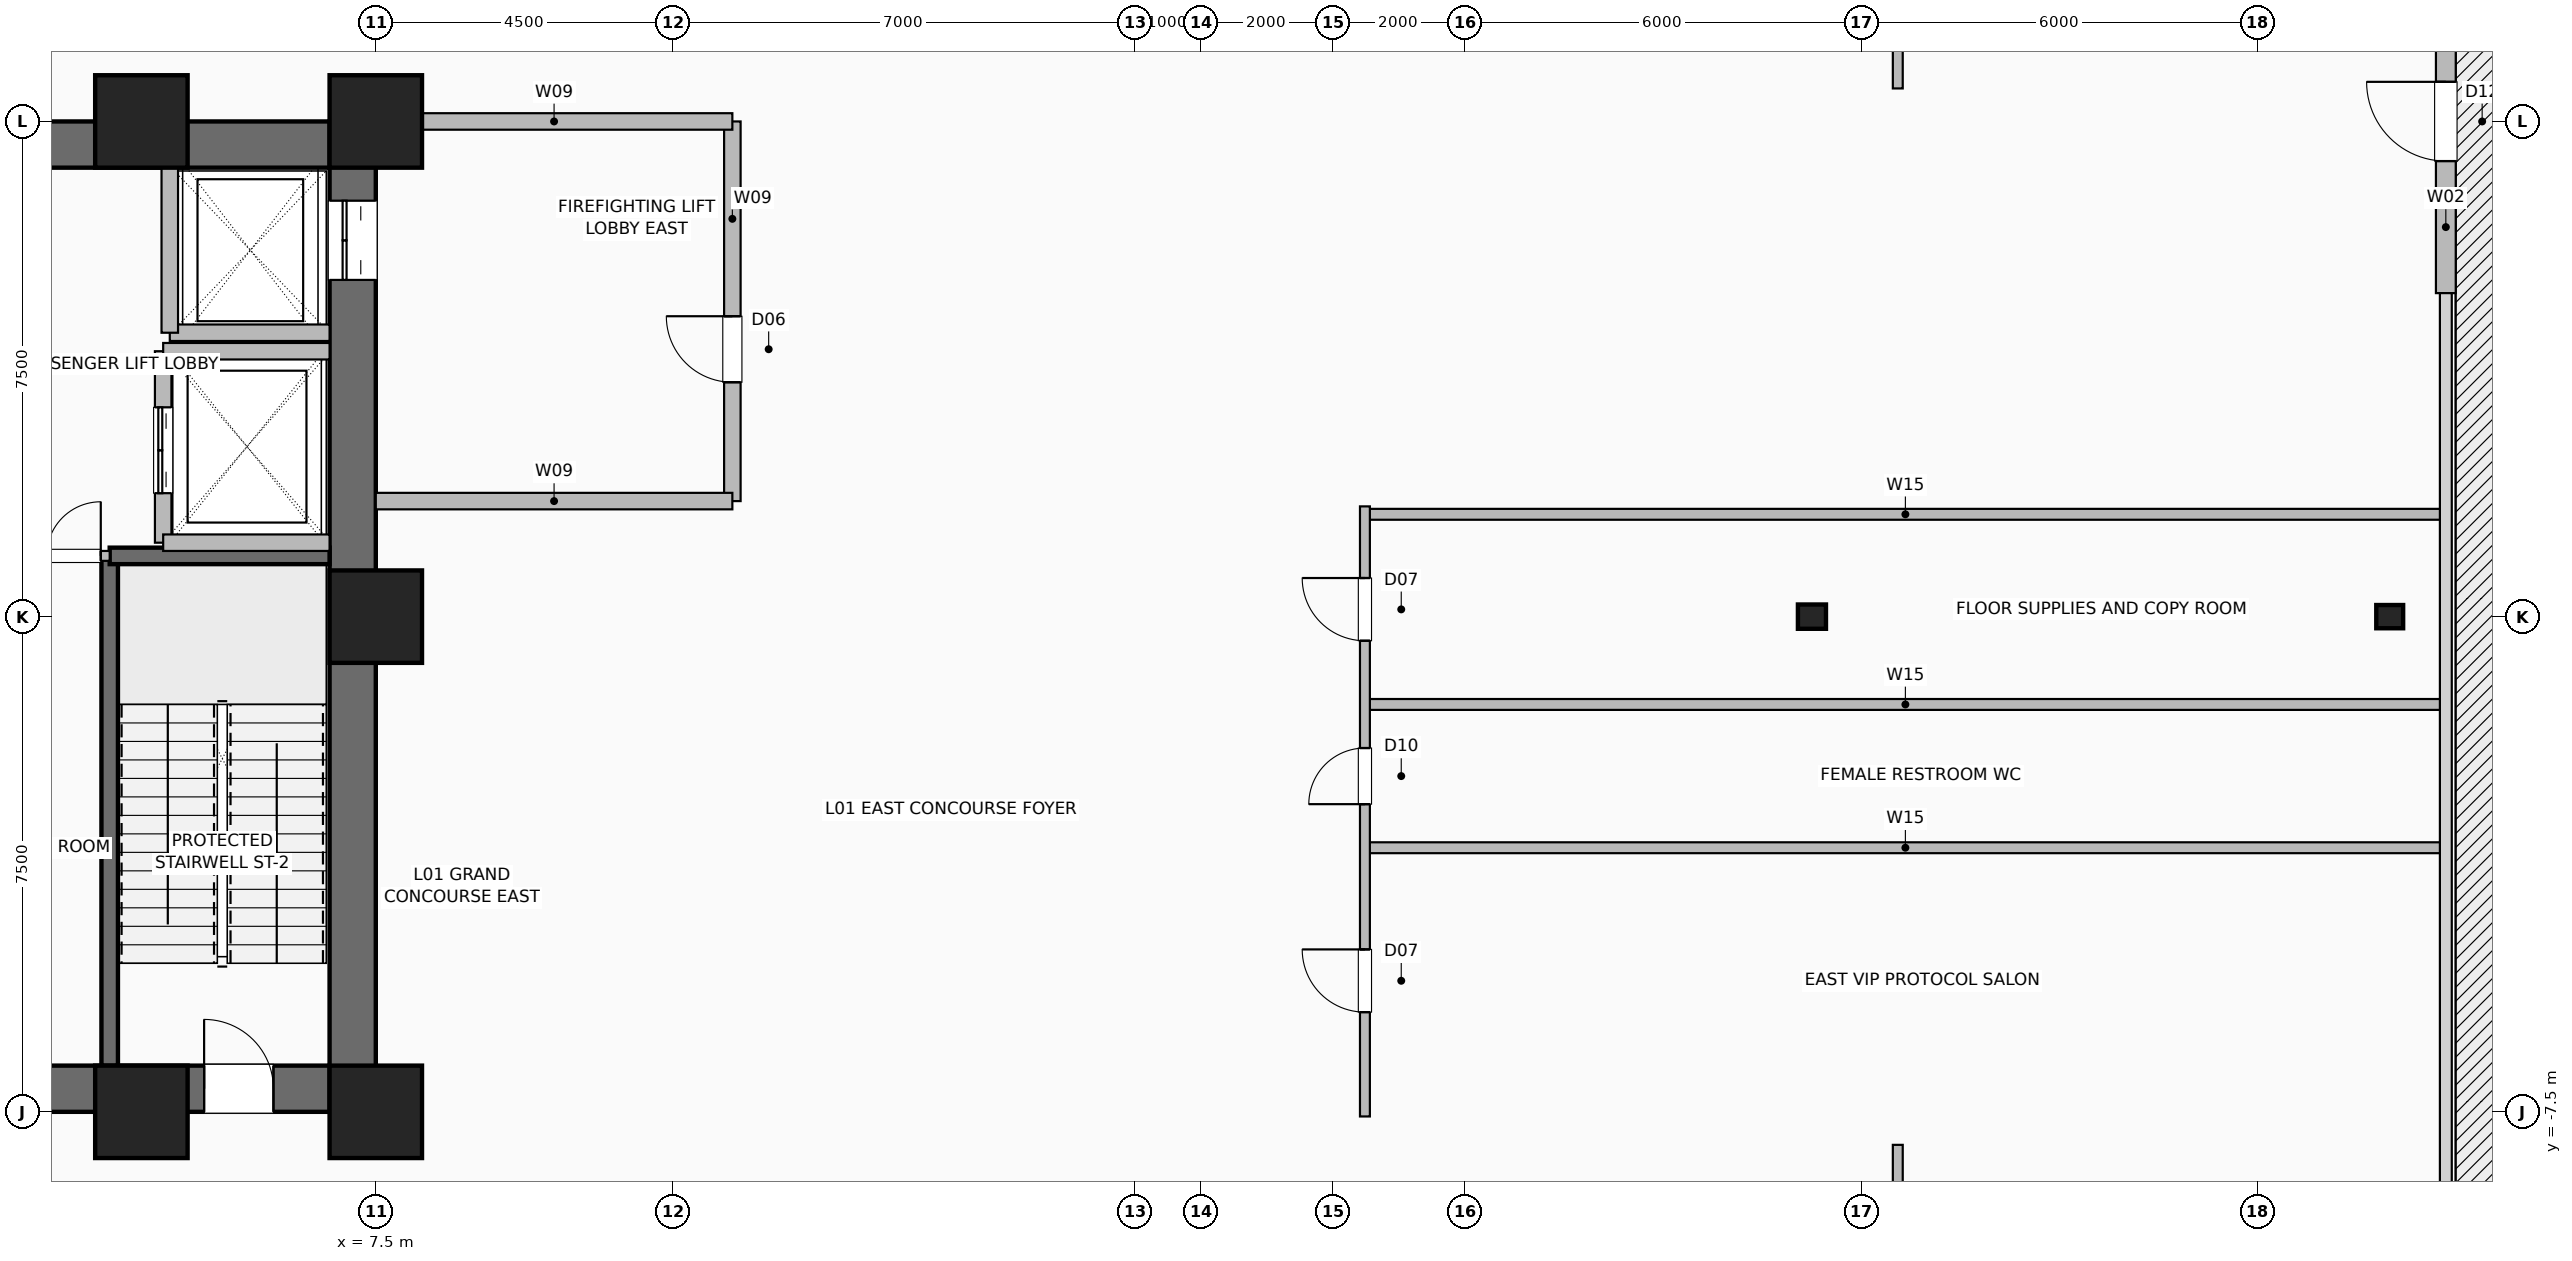
"""IFC4 building model, lengths in metres.
Left out: names, types, materials, properties, quantities, classifications, styles, units other than length and angle.
Written with IfcOpenShell. Run it as: python <this file> out.ifc"""

import sys

from ifc_helpers import new_model, si_unit, direction, frame, frame_2d, origin, origin_2d, place, context, subcontext, project, spatial, rectangle, hollow_rectangle, i_section, extrude, element, fill, save


model = new_model("IFC4")
c1 = context("Model", 3, precision=1e-05, world=origin(), true_north=direction((0.0, 1.0)))
c2 = subcontext(c1, "Body", "Model", "MODEL_VIEW")
j1 = project(units=[si_unit("LENGTHUNIT", "METRE"), si_unit("PLANEANGLEUNIT", "RADIAN")], contexts=[c1])
p1 = place(None, origin())
s1 = spatial("IfcSite", under=j1, at=p1, CompositionType="ELEMENT")
p2 = place(p1, origin())
s2 = spatial("IfcBuilding", under=s1, at=p2, CompositionType="ELEMENT")
p3 = place(p2, frame((0.0, 0.0, 5.4)))
s3 = spatial("IfcBuildingStorey", under=s2, at=p3, CompositionType="ELEMENT", Elevation=5.4)
for number, where, z_axis, x_axis in (
    (1, (3.95, -7.5, 0.0), (0.0, 0.0, 1.0), (1.0, 0.0, 0.0)),
    (2, (7.5, -7.5, 0.0), (0.0, 0.0, 1.0), (1.0, 0.0, 0.0)),
    (3, (7.5, 0.0, 0.0), (0.0, 0.0, 1.0), (1.0, 0.0, 0.0)),
    (4, (7.5, 7.5, 0.0), (0.0, 0.0, 1.0), (1.0, 0.0, 0.0)),
    (5, (3.95, 7.5, 0.0), (0.0, 0.0, 1.0), (1.0, 0.0, 0.0)),
):
    element("IfcColumn", number, at=place(p3, frame(where, z_axis=z_axis, x_axis=x_axis)), inside=s3, PredefinedType="COLUMN", context=c2, shape_type="SweptSolid", body=[
        extrude(hollow_rectangle(XDim=1.4, YDim=1.4, WallThickness=0.06, at=origin_2d()), origin(), (0.0, 0.0, 1.0), 5.4),
    ])
p4 = place(p3, frame((29.25, 0.0, 0.0), z_axis=(0.0, 0.0, 1.0), x_axis=(1.0, 0.0, 0.0)))
e6 = element("IfcColumn", 6, at=p4, inside=s3, PredefinedType="COLUMN", context=c2, shape_type="SweptSolid", body=[
    extrude(i_section(OverallWidth=0.368, OverallDepth=0.425, WebThickness=0.03, FlangeThickness=0.048, FilletRadius=0.02, at=origin_2d()), origin(), (0.0, 0.0, 1.0), 5.4),
])
p5 = place(p3, frame((38.0, 0.0, -0.4), z_axis=(0.0, 0.0, 1.0), x_axis=(1.0, 0.0, 0.0)))
e7 = element("IfcColumn", 7, at=p5, inside=s3, PredefinedType="COLUMN", context=c2, shape_type="SweptSolid", body=[
    extrude(i_section(OverallWidth=0.352, OverallDepth=0.407, WebThickness=0.025, FlangeThickness=0.04, FilletRadius=0.02, at=origin_2d()), origin(), (0.0, 0.0, 1.0), 5.4),
])
p6 = place(p3, frame((38.85, 4.9, 0.0), z_axis=(0.0, 0.0, 1.0), x_axis=(0.0, 1.0, 0.0)))
e8 = element("IfcWall", 8, at=p6, inside=s3, PredefinedType="SOLIDWALL", context=c2, shape_type="SweptSolid", body=[
    extrude(rectangle(XDim=5.2, YDim=0.3, at=frame_2d((2.6, 0.0))), origin(), (0.0, 0.0, 1.0), 5.0),
])
p7 = place(p6, frame((2.0, 0.0, 0.0)))
e9 = element("IfcOpeningElement", 9, at=p7, cuts=e8, PredefinedType="OPENING", context=c2, shape_type="SweptSolid", body=[
    extrude(rectangle(XDim=1.2, YDim=2.25, at=frame_2d((0.6, 1.125))), frame((0.0, 0.16, 0.0), z_axis=(0.0, -1.0, 0.0), x_axis=(1.0, 0.0, 0.0)), (0.0, 0.0, 1.0), 0.32),
])
p8 = place(p3, frame((-7.5, -7.15, 0.0), z_axis=(0.0, 0.0, 1.0), x_axis=(1.0, 0.0, 0.0)))
e10 = element("IfcWall", 10, at=p8, inside=s3, PredefinedType="SHEAR", context=c2, shape_type="SweptSolid", body=[
    extrude(rectangle(XDim=15.0, YDim=0.7, at=frame_2d((7.5, 0.0))), origin(), (0.0, 0.0, 1.0), 5.0),
])
p9 = place(p8, frame((1.55, 0.0, 0.0)))
e11 = element("IfcOpeningElement", 11, at=p9, cuts=e10, PredefinedType="OPENING", context=c2, shape_type="SweptSolid", body=[
    extrude(rectangle(XDim=1.05, YDim=2.08, at=frame_2d((0.525, 1.04))), frame((0.0, 0.36, 0.0), z_axis=(0.0, -1.0, 0.0), x_axis=(1.0, 0.0, 0.0)), (0.0, 0.0, 1.0), 0.72),
])
p10 = place(p8, frame((12.4, 0.0, 0.0)))
e12 = element("IfcOpeningElement", 12, at=p10, cuts=e10, PredefinedType="OPENING", context=c2, shape_type="SweptSolid", body=[
    extrude(rectangle(XDim=1.05, YDim=2.08, at=frame_2d((0.525, 1.04))), frame((0.0, 0.36, 0.0), z_axis=(0.0, -1.0, 0.0), x_axis=(1.0, 0.0, 0.0)), (0.0, 0.0, 1.0), 0.72),
])
p11 = place(p8, frame((4.64, 0.0, 0.0)))
e13 = element("IfcOpeningElement", 13, at=p11, cuts=e10, PredefinedType="OPENING", context=c2, shape_type="SweptSolid", body=[
    extrude(rectangle(XDim=1.1, YDim=2.2, at=frame_2d((0.55, 1.1))), frame((0.0, 0.36, 0.0), z_axis=(0.0, -1.0, 0.0), x_axis=(1.0, 0.0, 0.0)), (0.0, 0.0, 1.0), 0.72),
])
p12 = place(p8, frame((6.52, 0.0, 0.0)))
e14 = element("IfcOpeningElement", 14, at=p12, cuts=e10, PredefinedType="OPENING", context=c2, shape_type="SweptSolid", body=[
    extrude(rectangle(XDim=1.1, YDim=2.2, at=frame_2d((0.55, 1.1))), frame((0.0, 0.36, 0.0), z_axis=(0.0, -1.0, 0.0), x_axis=(1.0, 0.0, 0.0)), (0.0, 0.0, 1.0), 0.72),
])
p13 = place(p8, frame((8.4, 0.0, 0.0)))
e15 = element("IfcOpeningElement", 15, at=p13, cuts=e10, PredefinedType="OPENING", context=c2, shape_type="SweptSolid", body=[
    extrude(rectangle(XDim=1.1, YDim=2.2, at=frame_2d((0.55, 1.1))), frame((0.0, 0.36, 0.0), z_axis=(0.0, -1.0, 0.0), x_axis=(1.0, 0.0, 0.0)), (0.0, 0.0, 1.0), 0.72),
])
p14 = place(p3, frame((-7.5, 7.15, 0.0), z_axis=(0.0, 0.0, 1.0), x_axis=(1.0, 0.0, 0.0)))
e16 = element("IfcWall", 16, at=p14, inside=s3, PredefinedType="SHEAR", context=c2, shape_type="SweptSolid", body=[
    extrude(rectangle(XDim=15.0, YDim=0.7, at=frame_2d((7.5, 0.0))), origin(), (0.0, 0.0, 1.0), 5.0),
])
p15 = place(p3, frame((7.15, -7.5, 0.0), z_axis=(0.0, 0.0, 1.0), x_axis=(0.0, 1.0, 0.0)))
e17 = element("IfcWall", 17, at=p15, inside=s3, PredefinedType="SHEAR", context=c2, shape_type="SweptSolid", body=[
    extrude(rectangle(XDim=15.0, YDim=0.7, at=frame_2d((7.5, 0.0))), origin(), (0.0, 0.0, 1.0), 5.0),
])
p16 = place(p15, frame((12.6, 0.0, 0.0)))
e18 = element("IfcOpeningElement", 18, at=p16, cuts=e17, PredefinedType="OPENING", context=c2, shape_type="SweptSolid", body=[
    extrude(rectangle(XDim=1.2, YDim=2.2, at=frame_2d((0.6, 1.1))), frame((0.0, 0.36, 0.0), z_axis=(0.0, -1.0, 0.0), x_axis=(1.0, 0.0, 0.0)), (0.0, 0.0, 1.0), 0.72),
])
p17 = place(p3, frame((3.47, -6.8, 0.0), z_axis=(0.0, 0.0, 1.0), x_axis=(0.0, 1.0, 0.0)))
e19 = element("IfcWall", 19, at=p17, inside=s3, PredefinedType="SHEAR", context=c2, shape_type="SweptSolid", body=[
    extrude(rectangle(XDim=7.72, YDim=0.25, at=frame_2d((3.86, 0.0))), origin(), (0.0, 0.0, 1.0), 5.0),
])
p18 = place(p3, frame((3.47, 0.92, 0.0), z_axis=(0.0, 0.0, 1.0), x_axis=(1.0, 0.0, 0.0)))
e20 = element("IfcWall", 20, at=p18, inside=s3, PredefinedType="SHEAR", context=c2, shape_type="SweptSolid", body=[
    extrude(rectangle(XDim=3.33, YDim=0.25, at=frame_2d((1.665, 0.0))), origin(), (0.0, 0.0, 1.0), 5.0),
])
p19 = place(p3, frame((4.38, 4.3, 0.0), z_axis=(0.0, 0.0, 1.0), x_axis=(1.0, 0.0, 0.0)))
e21 = element("IfcWall", 21, at=p19, inside=s3, PredefinedType="SHEAR", context=c2, shape_type="SweptSolid", body=[
    extrude(rectangle(XDim=2.42, YDim=0.25, at=frame_2d((1.21, 0.0))), origin(), (0.0, 0.0, 1.0), 5.0),
])
p20 = place(p3, frame((4.38, 4.3, 0.0), z_axis=(0.0, 0.0, 1.0), x_axis=(0.0, 1.0, 0.0)))
e22 = element("IfcWall", 22, at=p20, inside=s3, PredefinedType="SHEAR", context=c2, shape_type="SweptSolid", body=[
    extrude(rectangle(XDim=2.5, YDim=0.25, at=frame_2d((1.25, 0.0))), origin(), (0.0, 0.0, 1.0), 5.0),
])
p21 = place(p3, frame((4.28, 1.12, 0.0), z_axis=(0.0, 0.0, 1.0), x_axis=(0.0, 1.0, 0.0)))
e23 = element("IfcWall", 23, at=p21, inside=s3, PredefinedType="SHEAR", context=c2, shape_type="SweptSolid", body=[
    extrude(rectangle(XDim=2.9, YDim=0.25, at=frame_2d((1.45, 0.0))), origin(), (0.0, 0.0, 1.0), 5.0),
])
p22 = place(p21, frame((0.75, 0.0, 0.0)))
e24 = element("IfcOpeningElement", 24, at=p22, cuts=e23, PredefinedType="OPENING", context=c2, shape_type="SweptSolid", body=[
    extrude(rectangle(XDim=1.3, YDim=2.3, at=frame_2d((0.65, 1.15))), frame((0.0, 0.135, 0.0), z_axis=(0.0, -1.0, 0.0), x_axis=(1.0, 0.0, 0.0)), (0.0, 0.0, 1.0), 0.27),
])
for number, where, z_axis, x_axis in (
    (25, (4.28, 1.12, 0.0), (0.0, 0.0, 1.0), (1.0, 0.0, 0.0)),
    (26, (4.28, 4.02, 0.0), (0.0, 0.0, 1.0), (1.0, 0.0, 0.0)),
):
    element("IfcWall", number, at=place(p3, frame(where, z_axis=z_axis, x_axis=x_axis)), inside=s3, PredefinedType="SHEAR", context=c2, shape_type="SweptSolid", body=[
        extrude(rectangle(XDim=2.52, YDim=0.25, at=frame_2d((1.26, 0.0))), origin(), (0.0, 0.0, 1.0), 5.0),
    ])
p23 = place(p3, frame((2.38, 0.92, 0.0), z_axis=(0.0, 0.0, 1.0), x_axis=(1.0, 0.0, 0.0)))
e27 = element("IfcWall", 27, at=p23, inside=s3, PredefinedType="PARTITIONING", context=c2, shape_type="SweptSolid", body=[
    extrude(rectangle(XDim=1.09, YDim=0.15, at=frame_2d((0.545, 0.0))), origin(), (0.0, 0.0, 1.0), 5.0),
])
p24 = place(p23, frame((0.135, 0.0, 0.0)))
e28 = element("IfcOpeningElement", 28, at=p24, cuts=e27, PredefinedType="OPENING", context=c2, shape_type="SweptSolid", body=[
    extrude(rectangle(XDim=0.82, YDim=2.05, at=frame_2d((0.41, 1.025))), frame((0.0, 0.085, 0.0), z_axis=(0.0, -1.0, 0.0), x_axis=(1.0, 0.0, 0.0)), (0.0, 0.0, 1.0), 0.17),
])
p25 = place(p3, frame((12.9, 1.75, 0.0), z_axis=(0.0, 0.0, 1.0), x_axis=(0.0, 1.0, 0.0)))
e29 = element("IfcWall", 29, at=p25, inside=s3, PredefinedType="SHEAR", context=c2, shape_type="SweptSolid", body=[
    extrude(rectangle(XDim=5.75, YDim=0.25, at=frame_2d((2.875, 0.0))), origin(), (0.0, 0.0, 1.0), 5.0),
])
p26 = place(p25, frame((1.8, 0.0, 0.0)))
e30 = element("IfcOpeningElement", 30, at=p26, cuts=e29, PredefinedType="OPENING", context=c2, shape_type="SweptSolid", body=[
    extrude(rectangle(XDim=1.0, YDim=2.08, at=frame_2d((0.5, 1.04))), frame((0.0, 0.135, 0.0), z_axis=(0.0, -1.0, 0.0), x_axis=(1.0, 0.0, 0.0)), (0.0, 0.0, 1.0), 0.27),
])
for number, where, z_axis, x_axis in (
    (31, (7.5, 1.75, 0.0), (0.0, 0.0, 1.0), (1.0, 0.0, 0.0)),
    (32, (7.5, 7.5, 0.0), (0.0, 0.0, 1.0), (1.0, 0.0, 0.0)),
):
    element("IfcWall", number, at=place(p3, frame(where, z_axis=z_axis, x_axis=x_axis)), inside=s3, PredefinedType="SHEAR", context=c2, shape_type="SweptSolid", body=[
        extrude(rectangle(XDim=5.4, YDim=0.25, at=frame_2d((2.7, 0.0))), origin(), (0.0, 0.0, 1.0), 5.0),
    ])
for number, where, z_axis, x_axis in (
    (33, (22.48, -1.33, 0.0), (0.0, 0.0, 1.0), (1.0, 0.0, 0.0)),
    (34, (22.48, -3.5, 0.0), (0.0, 0.0, 1.0), (1.0, 0.0, 0.0)),
    (35, (22.48, 1.55, 0.0), (0.0, 0.0, 1.0), (1.0, 0.0, 0.0)),
):
    element("IfcWall", number, at=place(p3, frame(where, z_axis=z_axis, x_axis=x_axis)), inside=s3, PredefinedType="PLUMBINGWALL", context=c2, shape_type="SweptSolid", body=[
        extrude(rectangle(XDim=16.37, YDim=0.165, at=frame_2d((8.185, 0.0))), origin(), (0.0, 0.0, 1.0), 5.0),
    ])
p27 = place(p3, frame((22.48, -7.57, 0.0), z_axis=(0.0, 0.0, 1.0), x_axis=(0.0, 1.0, 0.0)))
e36 = element("IfcWall", 36, at=p27, inside=s3, PredefinedType="PARTITIONING", context=c2, shape_type="SweptSolid", body=[
    extrude(rectangle(XDim=9.24, YDim=0.15, at=frame_2d((4.62, 0.0))), origin(), (0.0, 0.0, 1.0), 5.0),
])
p28 = place(p27, frame((1.58, 0.0, 0.0)))
e37 = element("IfcOpeningElement", 37, at=p28, cuts=e36, PredefinedType="OPENING", context=c2, shape_type="SweptSolid", body=[
    extrude(rectangle(XDim=0.95, YDim=2.06, at=frame_2d((0.475, 1.03))), frame((0.0, 0.085, 0.0), z_axis=(0.0, -1.0, 0.0), x_axis=(1.0, 0.0, 0.0)), (0.0, 0.0, 1.0), 0.17),
])
p29 = place(p27, frame((4.73, 0.0, 0.0)))
e38 = element("IfcOpeningElement", 38, at=p29, cuts=e36, PredefinedType="OPENING", context=c2, shape_type="SweptSolid", body=[
    extrude(rectangle(XDim=0.85, YDim=2.05, at=frame_2d((0.425, 1.025))), frame((0.0, 0.085, 0.0), z_axis=(0.0, -1.0, 0.0), x_axis=(1.0, 0.0, 0.0)), (0.0, 0.0, 1.0), 0.17),
])
p30 = place(p27, frame((7.205, 0.0, 0.0)))
e39 = element("IfcOpeningElement", 39, at=p30, cuts=e36, PredefinedType="OPENING", context=c2, shape_type="SweptSolid", body=[
    extrude(rectangle(XDim=0.95, YDim=2.06, at=frame_2d((0.475, 1.03))), frame((0.0, 0.085, 0.0), z_axis=(0.0, -1.0, 0.0), x_axis=(1.0, 0.0, 0.0)), (0.0, 0.0, 1.0), 0.17),
])
p31 = place(p3, frame((30.55, -26.0, 0.0), z_axis=(0.0, 0.0, 1.0), x_axis=(0.0, 1.0, 0.0)))
e40 = element("IfcWall", 40, at=p31, inside=s3, PredefinedType="PARTITIONING", context=c2, shape_type="SweptSolid", body=[
    extrude(rectangle(XDim=18.0, YDim=0.15, at=frame_2d((9.0, 0.0))), origin(), (0.0, 0.0, 1.0), 5.0),
])
p32 = place(p31, frame((14.5, 0.0, 0.0)))
e41 = element("IfcOpeningElement", 41, at=p32, cuts=e40, PredefinedType="OPENING", context=c2, shape_type="SweptSolid", body=[
    extrude(rectangle(XDim=1.8, YDim=2.08, at=frame_2d((0.9, 1.04))), frame((0.0, 0.085, 0.0), z_axis=(0.0, -1.0, 0.0), x_axis=(1.0, 0.0, 0.0)), (0.0, 0.0, 1.0), 0.17),
])
p33 = place(p3, frame((30.55, 8.0, 0.0), z_axis=(0.0, 0.0, 1.0), x_axis=(0.0, 1.0, 0.0)))
e42 = element("IfcWall", 42, at=p33, inside=s3, PredefinedType="PARTITIONING", context=c2, shape_type="SweptSolid", body=[
    extrude(rectangle(XDim=18.0, YDim=0.15, at=frame_2d((9.0, 0.0))), origin(), (0.0, 0.0, 1.0), 5.0),
])
p34 = place(p33, frame((2.0, 0.0, 0.0)))
e43 = element("IfcOpeningElement", 43, at=p34, cuts=e42, PredefinedType="OPENING", context=c2, shape_type="SweptSolid", body=[
    extrude(rectangle(XDim=1.8, YDim=2.08, at=frame_2d((0.9, 1.04))), frame((0.0, 0.085, 0.0), z_axis=(0.0, -1.0, 0.0), x_axis=(1.0, 0.0, 0.0)), (0.0, 0.0, 1.0), 0.17),
])
p35 = place(p7, origin())
e44 = element("IfcDoor", 44, at=p35, inside=s3, OperationType="SINGLE_SWING_RIGHT", PredefinedType="DOOR", context=c2, shape_type="SweptSolid", body=[
    extrude(rectangle(XDim=1.2, YDim=2.25, at=frame_2d((0.6, 1.125))), frame((0.0, 0.025, 0.0), z_axis=(0.0, -1.0, 0.0), x_axis=(1.0, 0.0, 0.0)), (0.0, 0.0, 1.0), 0.05),
])
fill(e9, e44)
p36 = place(p10, origin())
e45 = element("IfcDoor", 45, at=p36, inside=s3, OperationType="SINGLE_SWING_LEFT", PredefinedType="DOOR", context=c2, shape_type="SweptSolid", body=[
    extrude(rectangle(XDim=1.05, YDim=2.08, at=frame_2d((0.525, 1.04))), frame((0.0, 0.025, 0.0), z_axis=(0.0, -1.0, 0.0), x_axis=(1.0, 0.0, 0.0)), (0.0, 0.0, 1.0), 0.05),
])
fill(e12, e45)
p37 = place(p16, origin())
e46 = element("IfcDoor", 46, at=p37, inside=s3, OperationType="DOUBLE_DOOR_SLIDING", PredefinedType="DOOR", context=c2, shape_type="SweptSolid", body=[
    extrude(rectangle(XDim=1.2, YDim=2.2, at=frame_2d((0.6, 1.1))), frame((0.0, 0.025, 0.0), z_axis=(0.0, -1.0, 0.0), x_axis=(1.0, 0.0, 0.0)), (0.0, 0.0, 1.0), 0.05),
])
fill(e18, e46)
p38 = place(p22, origin())
e47 = element("IfcDoor", 47, at=p38, inside=s3, OperationType="DOUBLE_DOOR_SLIDING", PredefinedType="DOOR", context=c2, shape_type="SweptSolid", body=[
    extrude(rectangle(XDim=1.3, YDim=2.3, at=frame_2d((0.65, 1.15))), frame((0.0, 0.025, 0.0), z_axis=(0.0, -1.0, 0.0), x_axis=(1.0, 0.0, 0.0)), (0.0, 0.0, 1.0), 0.05),
])
fill(e24, e47)
p39 = place(p24, origin())
e48 = element("IfcDoor", 48, at=p39, inside=s3, OperationType="SINGLE_SWING_RIGHT", PredefinedType="DOOR", context=c2, shape_type="SweptSolid", body=[
    extrude(rectangle(XDim=0.82, YDim=2.05, at=frame_2d((0.41, 1.025))), frame((0.0, 0.025, 0.0), z_axis=(0.0, -1.0, 0.0), x_axis=(1.0, 0.0, 0.0)), (0.0, 0.0, 1.0), 0.05),
])
fill(e28, e48)
p40 = place(p26, origin())
e49 = element("IfcDoor", 49, at=p40, inside=s3, OperationType="SINGLE_SWING_RIGHT", PredefinedType="DOOR", context=c2, shape_type="SweptSolid", body=[
    extrude(rectangle(XDim=1.0, YDim=2.08, at=frame_2d((0.5, 1.04))), frame((0.0, 0.025, 0.0), z_axis=(0.0, -1.0, 0.0), x_axis=(1.0, 0.0, 0.0)), (0.0, 0.0, 1.0), 0.05),
])
fill(e30, e49)
p41 = place(p28, origin())
e50 = element("IfcDoor", 50, at=p41, inside=s3, OperationType="SINGLE_SWING_RIGHT", PredefinedType="DOOR", context=c2, shape_type="SweptSolid", body=[
    extrude(rectangle(XDim=0.95, YDim=2.06, at=frame_2d((0.475, 1.03))), frame((0.0, 0.025, 0.0), z_axis=(0.0, -1.0, 0.0), x_axis=(1.0, 0.0, 0.0)), (0.0, 0.0, 1.0), 0.05),
])
fill(e37, e50)
p42 = place(p29, origin())
e51 = element("IfcDoor", 51, at=p42, inside=s3, OperationType="SINGLE_SWING_LEFT", PredefinedType="DOOR", context=c2, shape_type="SweptSolid", body=[
    extrude(rectangle(XDim=0.85, YDim=2.05, at=frame_2d((0.425, 1.025))), frame((0.0, 0.025, 0.0), z_axis=(0.0, -1.0, 0.0), x_axis=(1.0, 0.0, 0.0)), (0.0, 0.0, 1.0), 0.05),
])
fill(e38, e51)
p43 = place(p30, origin())
e52 = element("IfcDoor", 52, at=p43, inside=s3, OperationType="SINGLE_SWING_RIGHT", PredefinedType="DOOR", context=c2, shape_type="SweptSolid", body=[
    extrude(rectangle(XDim=0.95, YDim=2.06, at=frame_2d((0.475, 1.03))), frame((0.0, 0.025, 0.0), z_axis=(0.0, -1.0, 0.0), x_axis=(1.0, 0.0, 0.0)), (0.0, 0.0, 1.0), 0.05),
])
fill(e39, e52)
save(model, sys.argv[1])
